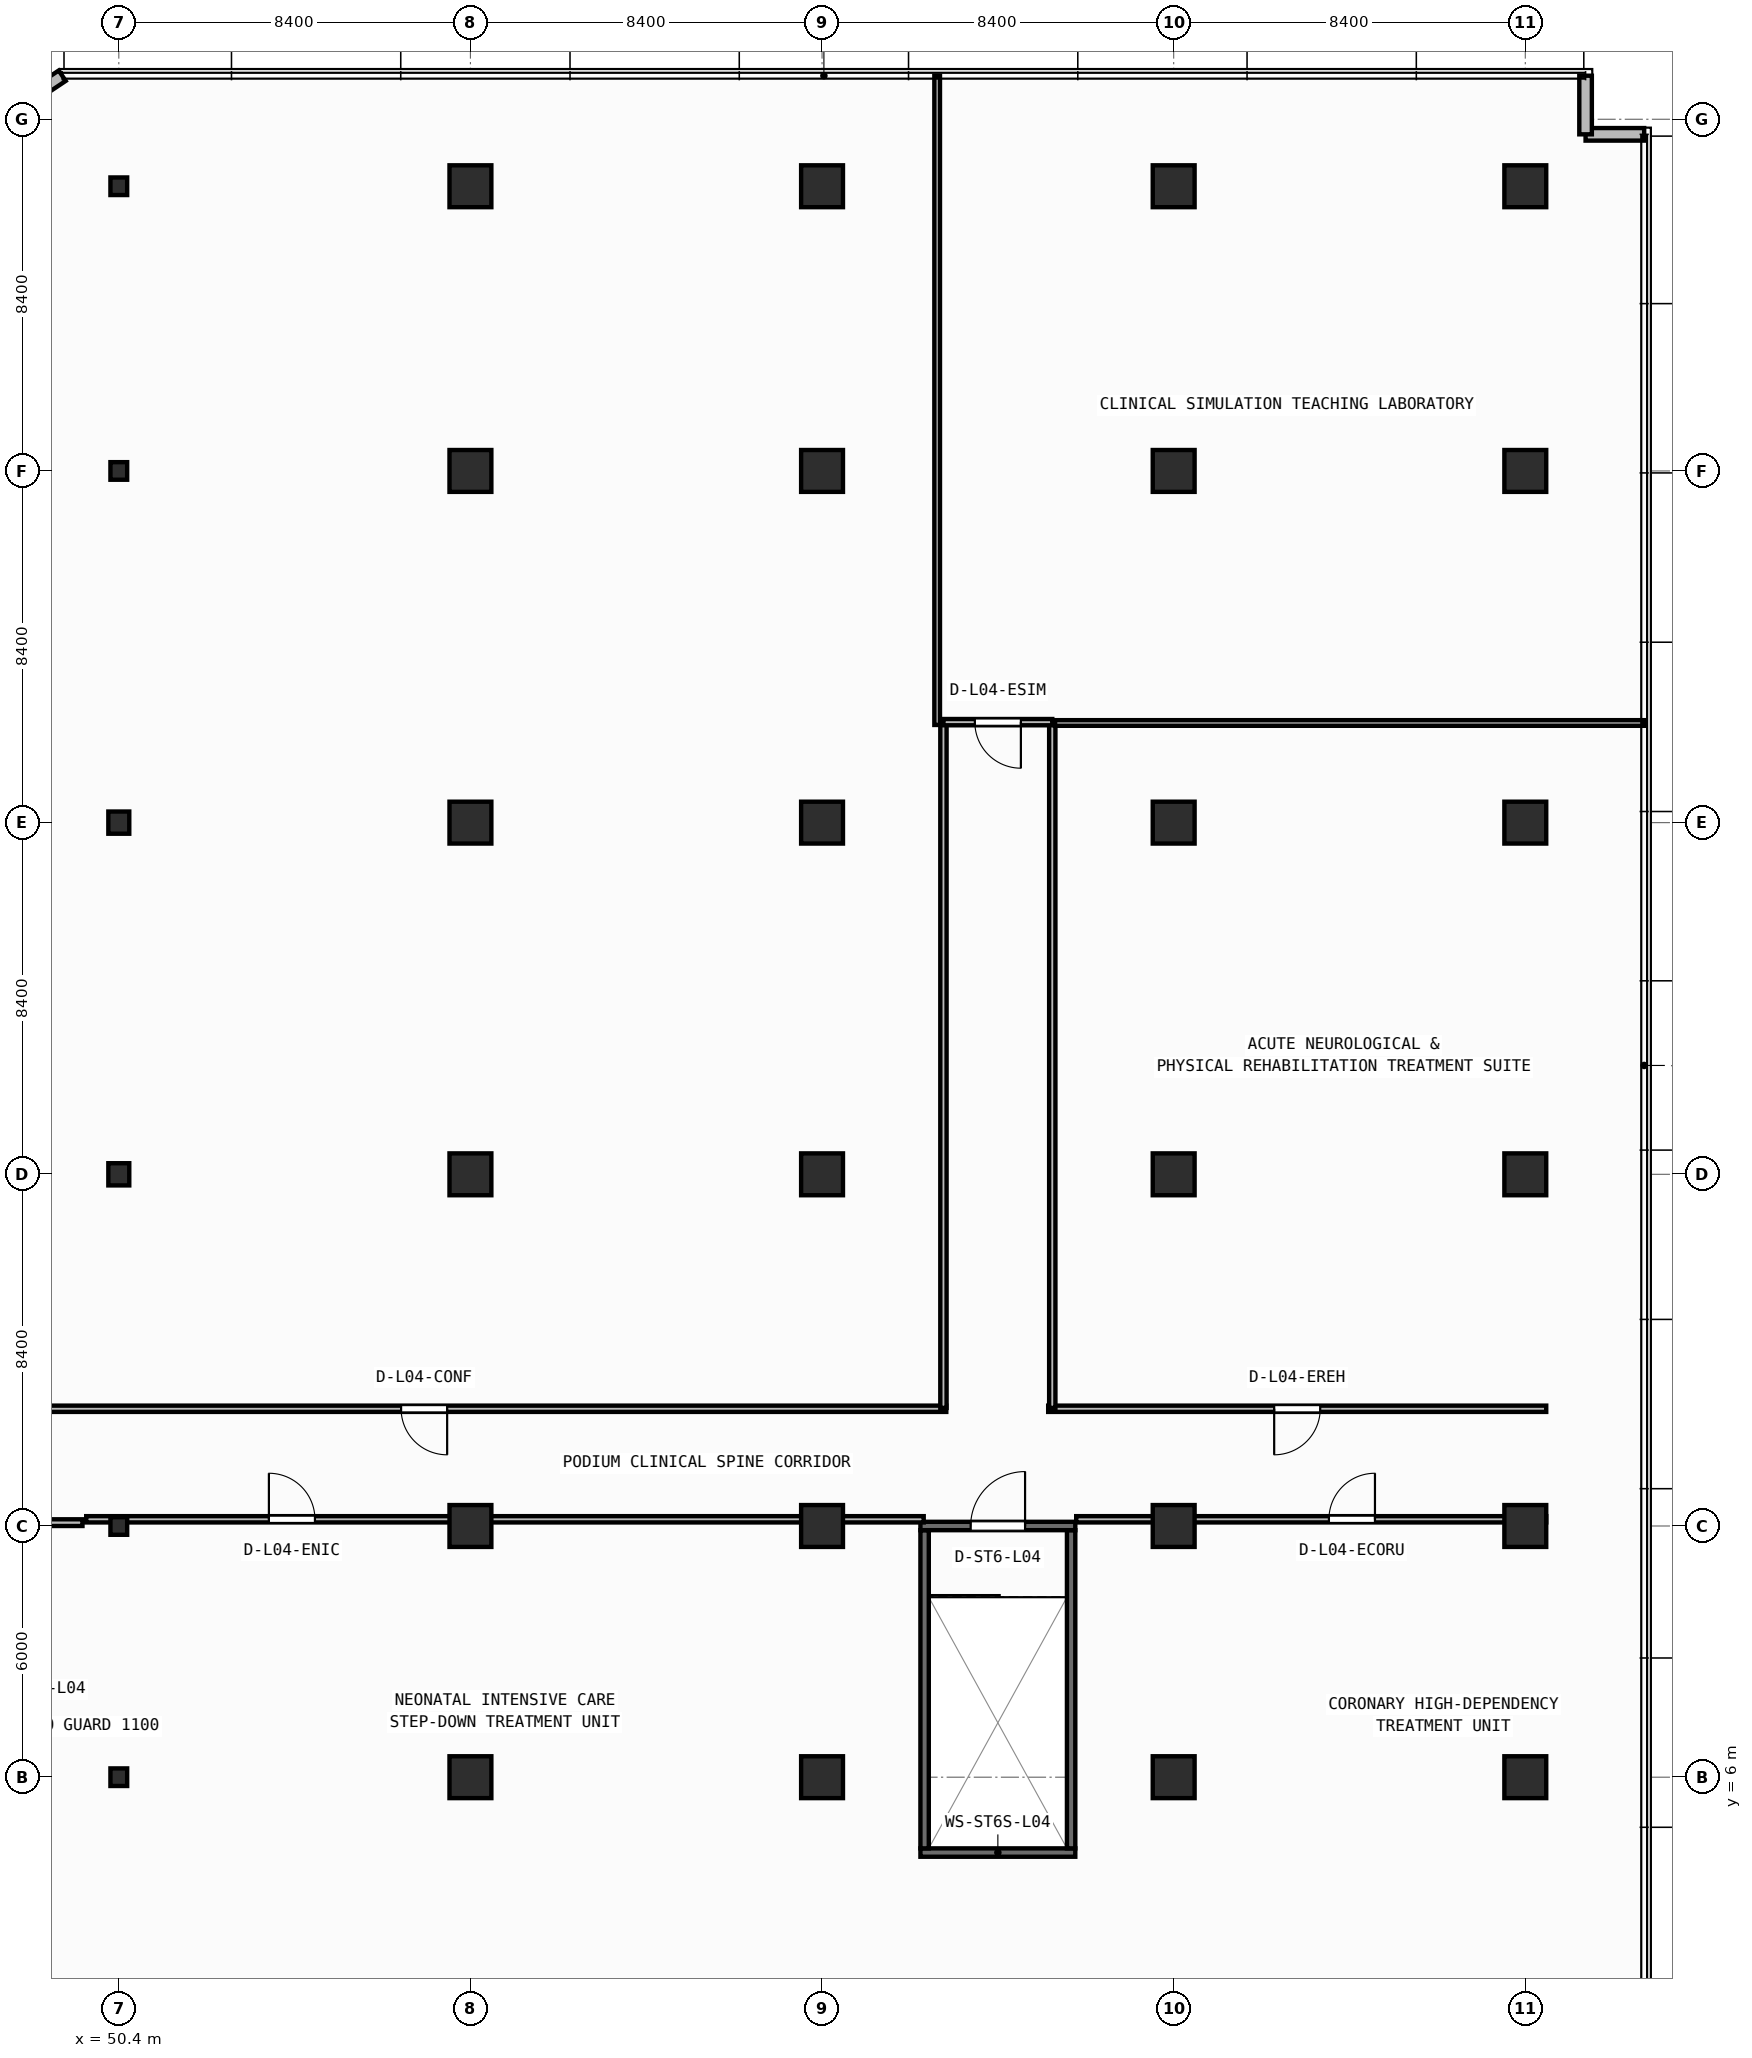
"""IFC4 building model, lengths in metres.
Left out: names, types, materials, properties, quantities, classifications, styles, units other than length and angle.
Written with IfcOpenShell. Run it as: python <this file> out.ifc"""

import sys

from ifc_helpers import new_model, si_unit, direction, frame, frame_2d, origin, origin_2d, place, context, subcontext, project, spatial, rectangle, circle, i_section, extrude, element, fill, save


model = new_model("IFC4")
c1 = context("Model", 3, precision=1e-05, world=origin(), true_north=direction((0.0, 1.0)))
c2 = subcontext(c1, "Body", "Model", "MODEL_VIEW")
j1 = project(units=[si_unit("LENGTHUNIT", "METRE"), si_unit("PLANEANGLEUNIT", "RADIAN")], contexts=[c1])
p1 = place(None, origin())
s1 = spatial("IfcSite", under=j1, at=p1, CompositionType="ELEMENT")
p2 = place(p1, origin())
s2 = spatial("IfcBuilding", under=s1, at=p2, CompositionType="ELEMENT")
p3 = place(p2, frame((0.0, 0.0, 18.0)))
s3 = spatial("IfcBuildingStorey", under=s2, at=p3, CompositionType="ELEMENT", Elevation=18.0)
p4 = place(p3, frame((50.4, 6.0, 0.0), z_axis=(0.0, 0.0, 1.0), x_axis=(1.0, 0.0, 0.0)))
e1 = element("IfcColumn", 1, at=p4, inside=s3, PredefinedType="COLUMN", context=c2, shape_type="SweptSolid", body=[
    extrude(i_section(OverallWidth=0.4, OverallDepth=0.42, WebThickness=0.025, FlangeThickness=0.04, at=origin_2d()), origin(), (0.0, 0.0, 1.0), 4.5),
])
for number, where, z_axis, x_axis in (
    (2, (58.8, 6.0, 0.0), (0.0, 0.0, 1.0), (1.0, 0.0, 0.0)),
    (3, (67.2, 6.0, 0.0), (0.0, 0.0, 1.0), (1.0, 0.0, 0.0)),
    (4, (75.6, 6.0, 0.0), (0.0, 0.0, 1.0), (1.0, 0.0, 0.0)),
    (5, (84.0, 6.0, 0.0), (0.0, 0.0, 1.0), (1.0, 0.0, 0.0)),
):
    element("IfcColumn", number, at=place(p3, frame(where, z_axis=z_axis, x_axis=x_axis)), inside=s3, PredefinedType="COLUMN", context=c2, shape_type="SweptSolid", body=[
        extrude(circle(Radius=0.5, at=origin_2d()), origin(), (0.0, 0.0, 1.0), 4.5),
    ])
p5 = place(p3, frame((50.4, 12.0, 0.0), z_axis=(0.0, 0.0, 1.0), x_axis=(1.0, 0.0, 0.0)))
e6 = element("IfcColumn", 6, at=p5, inside=s3, PredefinedType="COLUMN", context=c2, shape_type="SweptSolid", body=[
    extrude(i_section(OverallWidth=0.4, OverallDepth=0.42, WebThickness=0.025, FlangeThickness=0.04, at=origin_2d()), origin(), (0.0, 0.0, 1.0), 4.5),
])
for number, where, z_axis, x_axis in (
    (7, (58.8, 12.0, 0.0), (0.0, 0.0, 1.0), (1.0, 0.0, 0.0)),
    (8, (67.2, 12.0, 0.0), (0.0, 0.0, 1.0), (1.0, 0.0, 0.0)),
    (9, (75.6, 12.0, 0.0), (0.0, 0.0, 1.0), (1.0, 0.0, 0.0)),
    (10, (84.0, 12.0, 0.0), (0.0, 0.0, 1.0), (1.0, 0.0, 0.0)),
):
    element("IfcColumn", number, at=place(p3, frame(where, z_axis=z_axis, x_axis=x_axis)), inside=s3, PredefinedType="COLUMN", context=c2, shape_type="SweptSolid", body=[
        extrude(circle(Radius=0.5, at=origin_2d()), origin(), (0.0, 0.0, 1.0), 4.5),
    ])
p6 = place(p3, frame((50.4, 20.4, 0.0), z_axis=(0.0, 0.0, 1.0), x_axis=(1.0, 0.0, 0.0)))
e11 = element("IfcColumn", 11, at=p6, inside=s3, PredefinedType="COLUMN", context=c2, shape_type="SweptSolid", body=[
    extrude(i_section(OverallWidth=0.5, OverallDepth=0.53, WebThickness=0.028, FlangeThickness=0.045, at=origin_2d()), origin(), (0.0, 0.0, 1.0), 4.5),
])
for number, where, z_axis, x_axis in (
    (12, (58.8, 20.4, 0.0), (0.0, 0.0, 1.0), (1.0, 0.0, 0.0)),
    (13, (67.2, 20.4, 0.0), (0.0, 0.0, 1.0), (1.0, 0.0, 0.0)),
    (14, (75.6, 20.4, 0.0), (0.0, 0.0, 1.0), (1.0, 0.0, 0.0)),
    (15, (84.0, 20.4, 0.0), (0.0, 0.0, 1.0), (1.0, 0.0, 0.0)),
):
    element("IfcColumn", number, at=place(p3, frame(where, z_axis=z_axis, x_axis=x_axis)), inside=s3, PredefinedType="COLUMN", context=c2, shape_type="SweptSolid", body=[
        extrude(circle(Radius=0.5, at=origin_2d()), origin(), (0.0, 0.0, 1.0), 4.5),
    ])
p7 = place(p3, frame((50.4, 28.8, 0.0), z_axis=(0.0, 0.0, 1.0), x_axis=(1.0, 0.0, 0.0)))
e16 = element("IfcColumn", 16, at=p7, inside=s3, PredefinedType="COLUMN", context=c2, shape_type="SweptSolid", body=[
    extrude(i_section(OverallWidth=0.5, OverallDepth=0.53, WebThickness=0.028, FlangeThickness=0.045, at=origin_2d()), origin(), (0.0, 0.0, 1.0), 4.5),
])
for number, where, z_axis, x_axis in (
    (17, (58.8, 28.8, 0.0), (0.0, 0.0, 1.0), (1.0, 0.0, 0.0)),
    (18, (67.2, 28.8, 0.0), (0.0, 0.0, 1.0), (1.0, 0.0, 0.0)),
    (19, (75.6, 28.8, 0.0), (0.0, 0.0, 1.0), (1.0, 0.0, 0.0)),
    (20, (84.0, 28.8, 0.0), (0.0, 0.0, 1.0), (1.0, 0.0, 0.0)),
):
    element("IfcColumn", number, at=place(p3, frame(where, z_axis=z_axis, x_axis=x_axis)), inside=s3, PredefinedType="COLUMN", context=c2, shape_type="SweptSolid", body=[
        extrude(circle(Radius=0.5, at=origin_2d()), origin(), (0.0, 0.0, 1.0), 4.5),
    ])
p8 = place(p3, frame((50.4, 37.2, 0.0), z_axis=(0.0, 0.0, 1.0), x_axis=(1.0, 0.0, 0.0)))
e21 = element("IfcColumn", 21, at=p8, inside=s3, PredefinedType="COLUMN", context=c2, shape_type="SweptSolid", body=[
    extrude(i_section(OverallWidth=0.4, OverallDepth=0.42, WebThickness=0.025, FlangeThickness=0.04, at=origin_2d()), origin(), (0.0, 0.0, 1.0), 4.5),
])
for number, where, z_axis, x_axis in (
    (22, (58.8, 37.2, 0.0), (0.0, 0.0, 1.0), (1.0, 0.0, 0.0)),
    (23, (67.2, 37.2, 0.0), (0.0, 0.0, 1.0), (1.0, 0.0, 0.0)),
    (24, (75.6, 37.2, 0.0), (0.0, 0.0, 1.0), (1.0, 0.0, 0.0)),
    (25, (84.0, 37.2, 0.0), (0.0, 0.0, 1.0), (1.0, 0.0, 0.0)),
):
    element("IfcColumn", number, at=place(p3, frame(where, z_axis=z_axis, x_axis=x_axis)), inside=s3, PredefinedType="COLUMN", context=c2, shape_type="SweptSolid", body=[
        extrude(circle(Radius=0.5, at=origin_2d()), origin(), (0.0, 0.0, 1.0), 4.5),
    ])
p9 = place(p3, frame((50.4, 44.0, 0.0), z_axis=(0.0, 0.0, 1.0), x_axis=(1.0, 0.0, 0.0)))
e26 = element("IfcColumn", 26, at=p9, inside=s3, PredefinedType="COLUMN", context=c2, shape_type="SweptSolid", body=[
    extrude(i_section(OverallWidth=0.4, OverallDepth=0.42, WebThickness=0.025, FlangeThickness=0.04, at=origin_2d()), origin(), (0.0, 0.0, 1.0), 4.5),
])
for number, where, z_axis, x_axis in (
    (27, (58.8, 44.0, 0.0), (0.0, 0.0, 1.0), (1.0, 0.0, 0.0)),
    (28, (67.2, 44.0, 0.0), (0.0, 0.0, 1.0), (1.0, 0.0, 0.0)),
    (29, (75.6, 44.0, 0.0), (0.0, 0.0, 1.0), (1.0, 0.0, 0.0)),
    (30, (84.0, 44.0, 0.0), (0.0, 0.0, 1.0), (1.0, 0.0, 0.0)),
):
    element("IfcColumn", number, at=place(p3, frame(where, z_axis=z_axis, x_axis=x_axis)), inside=s3, PredefinedType="COLUMN", context=c2, shape_type="SweptSolid", body=[
        extrude(circle(Radius=0.5, at=origin_2d()), origin(), (0.0, 0.0, 1.0), 4.5),
    ])
p10 = place(p3, frame((86.84, 45.24, 0.0), z_axis=(0.0, 0.0, 1.0), x_axis=(-1.0, 0.0, 0.0)))
e31 = element("IfcWall", 31, at=p10, inside=s3, PredefinedType="STANDARD", context=c2, shape_type="SweptSolid", body=[
    extrude(rectangle(XDim=1.4, YDim=0.3, at=frame_2d((0.7, 0.0))), origin(), (0.0, 0.0, 1.0), 4.08),
])
p11 = place(p3, frame((85.44, 45.24, 0.0), z_axis=(0.0, 0.0, 1.0), x_axis=(0.0, 1.0, 0.0)))
e32 = element("IfcWall", 32, at=p11, inside=s3, PredefinedType="STANDARD", context=c2, shape_type="SweptSolid", body=[
    extrude(rectangle(XDim=1.4, YDim=0.3, at=frame_2d((0.7, 0.0))), origin(), (0.0, 0.0, 1.0), 4.08),
])
p12 = place(p3, frame((49.048, 46.64, 0.0), z_axis=(0.0, 0.0, 1.0), x_axis=(-0.832050294338, -0.554700196225, 0.0)))
e33 = element("IfcWall", 33, at=p12, inside=s3, PredefinedType="STANDARD", context=c2, shape_type="SweptSolid", body=[
    extrude(rectangle(XDim=7.211, YDim=0.3, at=frame_2d((3.605, 0.0))), origin(), (0.0, 0.0, 1.0), 4.08),
])
p13 = place(p12, frame((2.206, 0.0, 0.85)))
e34 = element("IfcOpeningElement", 34, at=p13, cuts=e33, PredefinedType="OPENING", context=c2, shape_type="SweptSolid", body=[
    extrude(rectangle(XDim=2.8, YDim=2.1, at=frame_2d((1.4, 1.05))), frame((0.0, 0.16, 0.0), z_axis=(0.0, -1.0, 0.0), x_axis=(1.0, 0.0, 0.0)), (0.0, 0.0, 1.0), 0.32),
])
p14 = place(p3, frame((69.55, 4.2, 0.0), z_axis=(0.0, 0.0, 1.0), x_axis=(1.0, 0.0, 0.0)))
e35 = element("IfcWall", 35, at=p14, inside=s3, PredefinedType="SHEAR", context=c2, shape_type="SweptSolid", body=[
    extrude(rectangle(XDim=3.7, YDim=0.2, at=frame_2d((1.85, 0.0))), origin(), (0.0, 0.0, 1.0), 4.08),
])
for number, where, z_axis, x_axis in (
    (36, (69.65, 4.3, 0.0), (0.0, 0.0, 1.0), (0.0, 1.0, 0.0)),
    (37, (73.15, 4.3, 0.0), (0.0, 0.0, 1.0), (0.0, 1.0, 0.0)),
):
    element("IfcWall", number, at=place(p3, frame(where, z_axis=z_axis, x_axis=x_axis)), inside=s3, PredefinedType="SHEAR", context=c2, shape_type="SweptSolid", body=[
        extrude(rectangle(XDim=7.6, YDim=0.2, at=frame_2d((3.8, 0.0))), origin(), (0.0, 0.0, 1.0), 4.08),
    ])
p15 = place(p3, frame((69.55, 12.0, 0.0), z_axis=(0.0, 0.0, 1.0), x_axis=(1.0, 0.0, 0.0)))
e38 = element("IfcWall", 38, at=p15, inside=s3, PredefinedType="SHEAR", context=c2, shape_type="SweptSolid", body=[
    extrude(rectangle(XDim=3.7, YDim=0.2, at=frame_2d((1.85, 0.0))), origin(), (0.0, 0.0, 1.0), 4.08),
])
p16 = place(p15, frame((1.2, 0.0, 0.0)))
e39 = element("IfcOpeningElement", 39, at=p16, cuts=e38, PredefinedType="OPENING", context=c2, shape_type="SweptSolid", body=[
    extrude(rectangle(XDim=1.3, YDim=2.15, at=frame_2d((0.65, 1.075))), frame((0.0, 0.11, 0.0), z_axis=(0.0, -1.0, 0.0), x_axis=(1.0, 0.0, 0.0)), (0.0, 0.0, 1.0), 0.22),
])
p17 = place(p3, frame((49.622, 12.16, 0.0), z_axis=(0.0, 0.0, 1.0), x_axis=(1.0, 0.0, 0.0)))
e40 = element("IfcWall", 40, at=p17, inside=s3, PredefinedType="PARTITIONING", context=c2, shape_type="SweptSolid", body=[
    extrude(rectangle(XDim=20.007, YDim=0.15, at=frame_2d((10.003, 0.0))), origin(), (0.0, 0.0, 1.0), 3.255),
])
p18 = place(p17, frame((4.364, 0.0, 0.0)))
e41 = element("IfcOpeningElement", 41, at=p18, cuts=e40, PredefinedType="OPENING", context=c2, shape_type="SweptSolid", body=[
    extrude(rectangle(XDim=1.1, YDim=2.1, at=frame_2d((0.55, 1.05))), frame((0.0, 0.085, 0.0), z_axis=(0.0, -1.0, 0.0), x_axis=(1.0, 0.0, 0.0)), (0.0, 0.0, 1.0), 0.17),
])
p19 = place(p3, frame((73.271, 12.16, 0.0), z_axis=(0.0, 0.0, 1.0), x_axis=(1.0, 0.0, 0.0)))
e42 = element("IfcWall", 42, at=p19, inside=s3, PredefinedType="PARTITIONING", context=c2, shape_type="SweptSolid", body=[
    extrude(rectangle(XDim=11.229, YDim=0.15, at=frame_2d((5.614, 0.0))), origin(), (0.0, 0.0, 1.0), 3.255),
])
p20 = place(p19, frame((6.037, 0.0, 0.0)))
e43 = element("IfcOpeningElement", 43, at=p20, cuts=e42, PredefinedType="OPENING", context=c2, shape_type="SweptSolid", body=[
    extrude(rectangle(XDim=1.1, YDim=2.1, at=frame_2d((0.55, 1.05))), frame((0.0, 0.085, 0.0), z_axis=(0.0, -1.0, 0.0), x_axis=(1.0, 0.0, 0.0)), (0.0, 0.0, 1.0), 0.17),
])
p21 = place(p3, frame((70.168, 14.8, 0.0), z_axis=(0.0, 0.0, 1.0), x_axis=(-1.0, 0.0, 0.0)))
e44 = element("IfcWall", 44, at=p21, inside=s3, PredefinedType="PARTITIONING", context=c2, shape_type="SweptSolid", body=[
    extrude(rectangle(XDim=24.948, YDim=0.15, at=frame_2d((12.474, 0.0))), origin(), (0.0, 0.0, 1.0), 4.08),
])
p22 = place(p21, frame((11.924, 0.0, 0.0)))
e45 = element("IfcOpeningElement", 45, at=p22, cuts=e44, PredefinedType="OPENING", context=c2, shape_type="SweptSolid", body=[
    extrude(rectangle(XDim=1.1, YDim=2.1, at=frame_2d((0.55, 1.05))), frame((0.0, 0.085, 0.0), z_axis=(0.0, -1.0, 0.0), x_axis=(1.0, 0.0, 0.0)), (0.0, 0.0, 1.0), 0.17),
])
p23 = place(p3, frame((84.5, 14.8, 0.0), z_axis=(0.0, 0.0, 1.0), x_axis=(-1.0, 0.0, 0.0)))
e46 = element("IfcWall", 46, at=p23, inside=s3, PredefinedType="PARTITIONING", context=c2, shape_type="SweptSolid", body=[
    extrude(rectangle(XDim=11.898, YDim=0.15, at=frame_2d((5.949, 0.0))), origin(), (0.0, 0.0, 1.0), 4.08),
])
p24 = place(p23, frame((5.399, 0.0, 0.0)))
e47 = element("IfcOpeningElement", 47, at=p24, cuts=e46, PredefinedType="OPENING", context=c2, shape_type="SweptSolid", body=[
    extrude(rectangle(XDim=1.1, YDim=2.1, at=frame_2d((0.55, 1.05))), frame((0.0, 0.085, 0.0), z_axis=(0.0, -1.0, 0.0), x_axis=(1.0, 0.0, 0.0)), (0.0, 0.0, 1.0), 0.17),
])
for number, where, z_axis, x_axis in (
    (48, (70.1, 31.2, 0.0), (0.0, 0.0, 1.0), (0.0, -1.0, 0.0)),
    (49, (72.7, 14.82, 0.0), (0.0, 0.0, 1.0), (0.0, 1.0, 0.0)),
):
    element("IfcWall", number, at=place(p3, frame(where, z_axis=z_axis, x_axis=x_axis)), inside=s3, PredefinedType="PARTITIONING", context=c2, shape_type="SweptSolid", body=[
        extrude(rectangle(XDim=16.38, YDim=0.15, at=frame_2d((8.19, 0.0))), origin(), (0.0, 0.0, 1.0), 4.08),
    ])
p25 = place(p3, frame((72.7, 31.2, 0.0), z_axis=(0.0, 0.0, 1.0), x_axis=(-1.0, 0.0, 0.0)))
e50 = element("IfcWall", 50, at=p25, inside=s3, PredefinedType="PARTITIONING", context=c2, shape_type="SweptSolid", body=[
    extrude(rectangle(XDim=2.6, YDim=0.15, at=frame_2d((1.3, 0.0))), origin(), (0.0, 0.0, 1.0), 4.08),
])
p26 = place(p25, frame((0.75, 0.0, 0.0)))
e51 = element("IfcOpeningElement", 51, at=p26, cuts=e50, PredefinedType="OPENING", context=c2, shape_type="SweptSolid", body=[
    extrude(rectangle(XDim=1.1, YDim=2.1, at=frame_2d((0.55, 1.05))), frame((0.0, 0.085, 0.0), z_axis=(0.0, -1.0, 0.0), x_axis=(1.0, 0.0, 0.0)), (0.0, 0.0, 1.0), 0.17),
])
p27 = place(p3, frame((69.95, 31.133, 0.0), z_axis=(0.0, 0.0, 1.0), x_axis=(0.0, 1.0, 0.0)))
e52 = element("IfcWall", 52, at=p27, inside=s3, PredefinedType="PARTITIONING", context=c2, shape_type="SweptSolid", body=[
    extrude(rectangle(XDim=15.507, YDim=0.135, at=frame_2d((7.753, 0.0))), origin(), (0.0, 0.0, 1.0), 4.08),
])
p28 = place(p3, frame((86.84, 31.18, 0.0), z_axis=(0.0, 0.0, 1.0), x_axis=(-1.0, 0.0, 0.0)))
e53 = element("IfcWall", 53, at=p28, inside=s3, PredefinedType="PARTITIONING", context=c2, shape_type="SweptSolid", body=[
    extrude(rectangle(XDim=14.075, YDim=0.135, at=frame_2d((7.038, 0.0))), origin(), (0.0, 0.0, 1.0), 4.08),
])
p29 = place(p3, frame((46.689, 12.08, 0.0), z_axis=(0.0, 0.0, 1.0), x_axis=(1.0, 0.0, 0.0)))
e54 = element("IfcWall", 54, at=p29, inside=s3, PredefinedType="PARTITIONING", context=c2, shape_type="SweptSolid", body=[
    extrude(rectangle(XDim=2.843, YDim=0.16, at=frame_2d((1.421, 0.0))), origin(), (0.0, 0.0, 1.0), 3.255),
])
p30 = place(p16, origin())
e55 = element("IfcDoor", 55, at=p30, inside=s3, OperationType="SINGLE_SWING_RIGHT", PredefinedType="DOOR", context=c2, shape_type="SweptSolid", body=[
    extrude(rectangle(XDim=1.3, YDim=2.15, at=frame_2d((0.65, 1.075))), frame((0.0, 0.025, 0.0), z_axis=(0.0, -1.0, 0.0), x_axis=(1.0, 0.0, 0.0)), (0.0, 0.0, 1.0), 0.05),
])
fill(e39, e55)
p31 = place(p18, origin())
e56 = element("IfcDoor", 56, at=p31, inside=s3, OperationType="SINGLE_SWING_LEFT", PredefinedType="DOOR", context=c2, shape_type="SweptSolid", body=[
    extrude(rectangle(XDim=1.1, YDim=2.1, at=frame_2d((0.55, 1.05))), frame((0.0, 0.025, 0.0), z_axis=(0.0, -1.0, 0.0), x_axis=(1.0, 0.0, 0.0)), (0.0, 0.0, 1.0), 0.05),
])
fill(e41, e56)
p32 = place(p20, origin())
e57 = element("IfcDoor", 57, at=p32, inside=s3, OperationType="SINGLE_SWING_RIGHT", PredefinedType="DOOR", context=c2, shape_type="SweptSolid", body=[
    extrude(rectangle(XDim=1.1, YDim=2.1, at=frame_2d((0.55, 1.05))), frame((0.0, 0.025, 0.0), z_axis=(0.0, -1.0, 0.0), x_axis=(1.0, 0.0, 0.0)), (0.0, 0.0, 1.0), 0.05),
])
fill(e43, e57)
p33 = place(p22, origin())
e58 = element("IfcDoor", 58, at=p33, inside=s3, OperationType="SINGLE_SWING_LEFT", PredefinedType="DOOR", context=c2, shape_type="SweptSolid", body=[
    extrude(rectangle(XDim=1.1, YDim=2.1, at=frame_2d((0.55, 1.05))), frame((0.0, 0.025, 0.0), z_axis=(0.0, -1.0, 0.0), x_axis=(1.0, 0.0, 0.0)), (0.0, 0.0, 1.0), 0.05),
])
fill(e45, e58)
p34 = place(p24, origin())
e59 = element("IfcDoor", 59, at=p34, inside=s3, OperationType="SINGLE_SWING_RIGHT", PredefinedType="DOOR", context=c2, shape_type="SweptSolid", body=[
    extrude(rectangle(XDim=1.1, YDim=2.1, at=frame_2d((0.55, 1.05))), frame((0.0, 0.025, 0.0), z_axis=(0.0, -1.0, 0.0), x_axis=(1.0, 0.0, 0.0)), (0.0, 0.0, 1.0), 0.05),
])
fill(e47, e59)
p35 = place(p26, origin())
e60 = element("IfcDoor", 60, at=p35, inside=s3, OperationType="SINGLE_SWING_LEFT", PredefinedType="DOOR", context=c2, shape_type="SweptSolid", body=[
    extrude(rectangle(XDim=1.1, YDim=2.1, at=frame_2d((0.55, 1.05))), frame((0.0, 0.025, 0.0), z_axis=(0.0, -1.0, 0.0), x_axis=(1.0, 0.0, 0.0)), (0.0, 0.0, 1.0), 0.05),
])
fill(e51, e60)
save(model, sys.argv[1])
